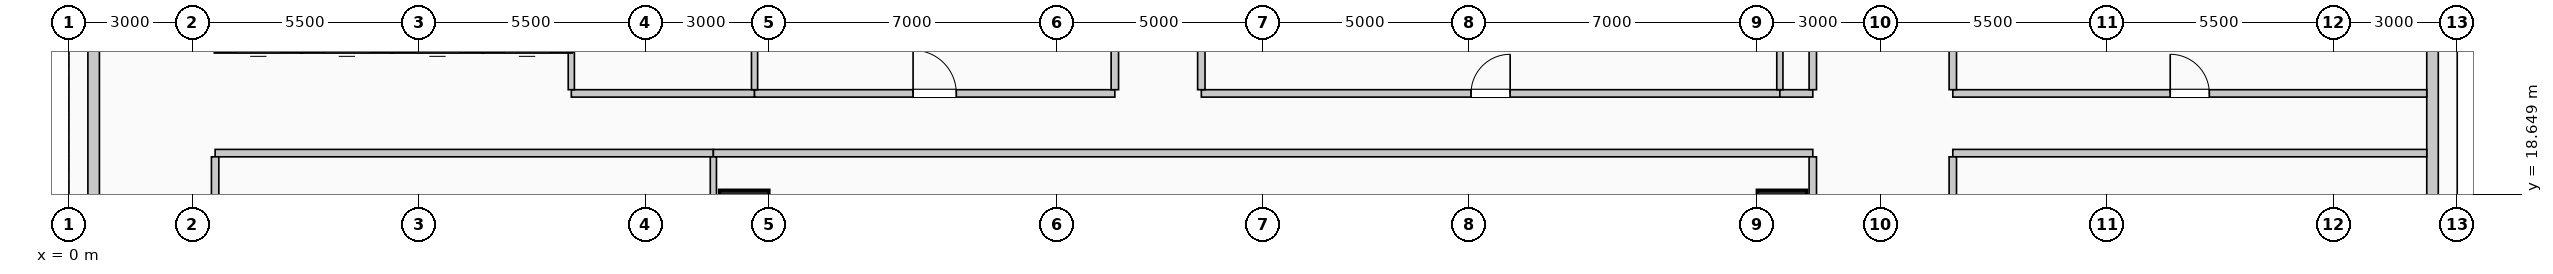
"""IFC4 building model, lengths in metres.
Left out: names, types, materials, properties, quantities, classifications, styles, units other than length and angle.
Written with IfcOpenShell. Run it as: python <this file> out.ifc"""

import sys

from ifc_helpers import new_model, si_unit, direction, frame, frame_2d, origin, origin_2d, place, context, subcontext, project, spatial, rectangle, extrude, element, fill, save


model = new_model("IFC4")
c1 = context("Model", 3, precision=1e-05, world=origin(), true_north=direction((0.0, 1.0)))
c2 = subcontext(c1, "Body", "Model", "MODEL_VIEW")
j1 = project(units=[si_unit("LENGTHUNIT", "METRE"), si_unit("PLANEANGLEUNIT", "RADIAN")], contexts=[c1])
p1 = place(None, origin())
s1 = spatial("IfcSite", under=j1, at=p1, CompositionType="ELEMENT")
p2 = place(p1, origin())
s2 = spatial("IfcBuilding", under=s1, at=p2, CompositionType="ELEMENT")
p3 = place(p2, frame((0.0, 0.0, 62.6)))
s3 = spatial("IfcBuildingStorey", under=s2, at=p3, CompositionType="ELEMENT", Elevation=62.6)
for number, where, z_axis, x_axis in (
    (1, (16.4, 18.0, 0.0), (0.0, 0.0, 1.0), (1.0, 0.0, 0.0)),
    (2, (41.6, 18.0, 0.0), (0.0, 0.0, 1.0), (1.0, 0.0, 0.0)),
):
    element("IfcColumn", number, at=place(p3, frame(where, z_axis=z_axis, x_axis=x_axis)), inside=s3, PredefinedType="COLUMN", context=c2, shape_type="SweptSolid", body=[
        extrude(rectangle(XDim=1.2, YDim=1.5, at=origin_2d()), origin(), (0.0, 0.0, 1.0), 4.0),
    ])
for number, where, z_axis, x_axis in (
    (3, (0.6, 18.47, 0.0), (0.0, 0.0, 1.0), (0.0, 1.0, 0.0)),
    (4, (57.4, 25.53, 0.0), (0.0, 0.0, 1.0), (0.0, -1.0, 0.0)),
):
    element("IfcWall", number, at=place(p3, frame(where, z_axis=z_axis, x_axis=x_axis)), inside=s3, PredefinedType="SOLIDWALL", context=c2, shape_type="SweptSolid", body=[
        extrude(rectangle(XDim=7.06, YDim=0.28, at=frame_2d((3.53, 0.0))), origin(), (0.0, 0.0, 1.0), 2.85),
    ])
p4 = place(p3, frame((5.65, 22.25, 0.0), z_axis=(0.0, 0.0, 1.0), x_axis=(-1.0, 0.0, 0.0)))
e5 = element("IfcWall", 5, at=p4, inside=s3, PredefinedType="SOLIDWALL", context=c2, shape_type="SweptSolid", body=[
    extrude(rectangle(XDim=2.1, YDim=0.3, at=frame_2d((1.05, 0.0))), origin(), (0.0, 0.0, 1.0), 4.0),
])
p5 = place(p4, frame((0.5, 0.0, 0.0)))
e6 = element("IfcOpeningElement", 6, at=p5, cuts=e5, PredefinedType="OPENING", context=c2, shape_type="SweptSolid", body=[
    extrude(rectangle(XDim=1.1, YDim=2.2, at=frame_2d((0.55, 1.1))), frame((0.0, 0.16, 0.0), z_axis=(0.0, -1.0, 0.0), x_axis=(1.0, 0.0, 0.0)), (0.0, 0.0, 1.0), 0.32),
])
p6 = place(p3, frame((7.85, 22.25, 0.0), z_axis=(0.0, 0.0, 1.0), x_axis=(-1.0, 0.0, 0.0)))
e7 = element("IfcWall", 7, at=p6, inside=s3, PredefinedType="SOLIDWALL", context=c2, shape_type="SweptSolid", body=[
    extrude(rectangle(XDim=2.2, YDim=0.3, at=frame_2d((1.1, 0.0))), origin(), (0.0, 0.0, 1.0), 4.0),
])
p7 = place(p6, frame((0.55, 0.0, 0.0)))
e8 = element("IfcOpeningElement", 8, at=p7, cuts=e7, PredefinedType="OPENING", context=c2, shape_type="SweptSolid", body=[
    extrude(rectangle(XDim=1.1, YDim=2.2, at=frame_2d((0.55, 1.1))), frame((0.0, 0.16, 0.0), z_axis=(0.0, -1.0, 0.0), x_axis=(1.0, 0.0, 0.0)), (0.0, 0.0, 1.0), 0.32),
])
p8 = place(p3, frame((10.05, 22.25, 0.0), z_axis=(0.0, 0.0, 1.0), x_axis=(-1.0, 0.0, 0.0)))
e9 = element("IfcWall", 9, at=p8, inside=s3, PredefinedType="SOLIDWALL", context=c2, shape_type="SweptSolid", body=[
    extrude(rectangle(XDim=2.2, YDim=0.3, at=frame_2d((1.1, 0.0))), origin(), (0.0, 0.0, 1.0), 4.0),
])
p9 = place(p8, frame((0.55, 0.0, 0.0)))
e10 = element("IfcOpeningElement", 10, at=p9, cuts=e9, PredefinedType="OPENING", context=c2, shape_type="SweptSolid", body=[
    extrude(rectangle(XDim=1.1, YDim=2.2, at=frame_2d((0.55, 1.1))), frame((0.0, 0.16, 0.0), z_axis=(0.0, -1.0, 0.0), x_axis=(1.0, 0.0, 0.0)), (0.0, 0.0, 1.0), 0.32),
])
p10 = place(p3, frame((12.2, 22.25, 0.0), z_axis=(0.0, 0.0, 1.0), x_axis=(-1.0, 0.0, 0.0)))
e11 = element("IfcWall", 11, at=p10, inside=s3, PredefinedType="SOLIDWALL", context=c2, shape_type="SweptSolid", body=[
    extrude(rectangle(XDim=2.15, YDim=0.3, at=frame_2d((1.075, 0.0))), origin(), (0.0, 0.0, 1.0), 4.0),
])
p11 = place(p10, frame((0.525, 0.0, 0.0)))
e12 = element("IfcOpeningElement", 12, at=p11, cuts=e11, PredefinedType="OPENING", context=c2, shape_type="SweptSolid", body=[
    extrude(rectangle(XDim=1.1, YDim=2.2, at=frame_2d((0.55, 1.1))), frame((0.0, 0.16, 0.0), z_axis=(0.0, -1.0, 0.0), x_axis=(1.0, 0.0, 0.0)), (0.0, 0.0, 1.0), 0.32),
])
p12 = place(p3, frame((3.55, 19.65, 0.0), z_axis=(0.0, 0.0, 1.0), x_axis=(1.0, 0.0, 0.0)))
e13 = element("IfcWall", 13, at=p12, inside=s3, PredefinedType="PARTITIONING", context=c2, shape_type="SweptSolid", body=[
    extrude(rectangle(XDim=12.1, YDim=0.18, at=frame_2d((6.05, 0.0))), origin(), (0.0, 0.0, 1.0), 3.7),
])
p13 = place(p3, frame((15.65, 19.65, 0.0), z_axis=(0.0, 0.0, 1.0), x_axis=(1.0, 0.0, 0.0)))
e14 = element("IfcWall", 14, at=p13, inside=s3, PredefinedType="PARTITIONING", context=c2, shape_type="SweptSolid", body=[
    extrude(rectangle(XDim=26.7, YDim=0.18, at=frame_2d((13.35, 0.0))), origin(), (0.0, 0.0, 1.0), 3.7),
])
p14 = place(p3, frame((45.75, 19.65, 0.0), z_axis=(0.0, 0.0, 1.0), x_axis=(1.0, 0.0, 0.0)))
e15 = element("IfcWall", 15, at=p14, inside=s3, PredefinedType="PARTITIONING", context=c2, shape_type="SweptSolid", body=[
    extrude(rectangle(XDim=11.51, YDim=0.18, at=frame_2d((5.755, 0.0))), origin(), (0.0, 0.0, 1.0), 3.7),
])
p15 = place(p3, frame((12.2, 21.1, 0.0), z_axis=(0.0, 0.0, 1.0), x_axis=(1.0, 0.0, 0.0)))
e16 = element("IfcWall", 16, at=p15, inside=s3, PredefinedType="PARTITIONING", context=c2, shape_type="SweptSolid", body=[
    extrude(rectangle(XDim=4.45, YDim=0.18, at=frame_2d((2.225, 0.0))), origin(), (0.0, 0.0, 1.0), 3.7),
])
p16 = place(p3, frame((16.65, 21.1, 0.0), z_axis=(0.0, 0.0, 1.0), x_axis=(1.0, 0.0, 0.0)))
e17 = element("IfcWall", 17, at=p16, inside=s3, PredefinedType="PARTITIONING", context=c2, shape_type="SweptSolid", body=[
    extrude(rectangle(XDim=8.75, YDim=0.18, at=frame_2d((4.375, 0.0))), origin(), (0.0, 0.0, 1.0), 3.7),
])
p17 = place(p16, frame((3.85, 0.0, 0.0)))
e18 = element("IfcOpeningElement", 18, at=p17, cuts=e17, PredefinedType="OPENING", context=c2, shape_type="SweptSolid", body=[
    extrude(rectangle(XDim=1.05, YDim=2.15, at=frame_2d((0.525, 1.075))), frame((0.0, 0.1, 0.0), z_axis=(0.0, -1.0, 0.0), x_axis=(1.0, 0.0, 0.0)), (0.0, 0.0, 1.0), 0.2),
])
p18 = place(p3, frame((27.5, 21.1, 0.0), z_axis=(0.0, 0.0, 1.0), x_axis=(1.0, 0.0, 0.0)))
e19 = element("IfcWall", 19, at=p18, inside=s3, PredefinedType="PARTITIONING", context=c2, shape_type="SweptSolid", body=[
    extrude(rectangle(XDim=14.05, YDim=0.18, at=frame_2d((7.025, 0.0))), origin(), (0.0, 0.0, 1.0), 3.7),
])
p19 = place(p18, frame((6.55, 0.0, 0.0)))
e20 = element("IfcOpeningElement", 20, at=p19, cuts=e19, PredefinedType="OPENING", context=c2, shape_type="SweptSolid", body=[
    extrude(rectangle(XDim=0.95, YDim=2.15, at=frame_2d((0.475, 1.075))), frame((0.0, 0.1, 0.0), z_axis=(0.0, -1.0, 0.0), x_axis=(1.0, 0.0, 0.0)), (0.0, 0.0, 1.0), 0.2),
])
p20 = place(p3, frame((41.55, 21.1, 0.0), z_axis=(0.0, 0.0, 1.0), x_axis=(1.0, 0.0, 0.0)))
e21 = element("IfcWall", 21, at=p20, inside=s3, PredefinedType="PARTITIONING", context=c2, shape_type="SweptSolid", body=[
    extrude(rectangle(XDim=0.8, YDim=0.18, at=frame_2d((0.4, 0.0))), origin(), (0.0, 0.0, 1.0), 3.7),
])
p21 = place(p3, frame((45.75, 21.1, 0.0), z_axis=(0.0, 0.0, 1.0), x_axis=(1.0, 0.0, 0.0)))
e22 = element("IfcWall", 22, at=p21, inside=s3, PredefinedType="PARTITIONING", context=c2, shape_type="SweptSolid", body=[
    extrude(rectangle(XDim=11.51, YDim=0.18, at=frame_2d((5.755, 0.0))), origin(), (0.0, 0.0, 1.0), 3.7),
])
p22 = place(p21, frame((5.28, 0.0, 0.0)))
e23 = element("IfcOpeningElement", 23, at=p22, cuts=e22, PredefinedType="OPENING", context=c2, shape_type="SweptSolid", body=[
    extrude(rectangle(XDim=0.95, YDim=2.15, at=frame_2d((0.475, 1.075))), frame((0.0, 0.1, 0.0), z_axis=(0.0, -1.0, 0.0), x_axis=(1.0, 0.0, 0.0)), (0.0, 0.0, 1.0), 0.2),
])
p23 = place(p3, frame((3.55, 16.39, 0.0), z_axis=(0.0, 0.0, 1.0), x_axis=(0.0, 1.0, 0.0)))
e24 = element("IfcWall", 24, at=p23, inside=s3, PredefinedType="PARTITIONING", context=c2, shape_type="SweptSolid", body=[
    extrude(rectangle(XDim=3.17, YDim=0.18, at=frame_2d((1.585, 0.0))), origin(), (0.0, 0.0, 1.0), 3.7),
])
p24 = place(p3, frame((12.2, 21.19, 0.0), z_axis=(0.0, 0.0, 1.0), x_axis=(0.0, 1.0, 0.0)))
e25 = element("IfcWall", 25, at=p24, inside=s3, PredefinedType="PARTITIONING", context=c2, shape_type="SweptSolid", body=[
    extrude(rectangle(XDim=0.91, YDim=0.15, at=frame_2d((0.455, 0.0))), origin(), (0.0, 0.0, 1.0), 3.7),
])
p25 = place(p3, frame((15.65, 16.39, 0.0), z_axis=(0.0, 0.0, 1.0), x_axis=(0.0, 1.0, 0.0)))
e26 = element("IfcWall", 26, at=p25, inside=s3, PredefinedType="PARTITIONING", context=c2, shape_type="SweptSolid", body=[
    extrude(rectangle(XDim=3.17, YDim=0.15, at=frame_2d((1.585, 0.0))), origin(), (0.0, 0.0, 1.0), 3.7),
])
p26 = place(p3, frame((16.65, 21.19, 0.0), z_axis=(0.0, 0.0, 1.0), x_axis=(0.0, 1.0, 0.0)))
e27 = element("IfcWall", 27, at=p26, inside=s3, PredefinedType="PARTITIONING", context=c2, shape_type="SweptSolid", body=[
    extrude(rectangle(XDim=3.735, YDim=0.15, at=frame_2d((1.868, 0.0))), origin(), (0.0, 0.0, 1.0), 2.995),
])
p27 = place(p3, frame((25.4, 21.19, 0.0), z_axis=(0.0, 0.0, 1.0), x_axis=(0.0, 1.0, 0.0)))
e28 = element("IfcWall", 28, at=p27, inside=s3, PredefinedType="PARTITIONING", context=c2, shape_type="SweptSolid", body=[
    extrude(rectangle(XDim=3.735, YDim=0.18, at=frame_2d((1.868, 0.0))), origin(), (0.0, 0.0, 1.0), 3.7),
])
p28 = place(p3, frame((27.5, 21.19, 0.0), z_axis=(0.0, 0.0, 1.0), x_axis=(0.0, 1.0, 0.0)))
e29 = element("IfcWall", 29, at=p28, inside=s3, PredefinedType="PARTITIONING", context=c2, shape_type="SweptSolid", body=[
    extrude(rectangle(XDim=5.72, YDim=0.18, at=frame_2d((2.86, 0.0))), origin(), (0.0, 0.0, 1.0), 3.7),
])
p29 = place(p3, frame((41.55, 21.19, 0.0), z_axis=(0.0, 0.0, 1.0), x_axis=(0.0, 1.0, 0.0)))
e30 = element("IfcWall", 30, at=p29, inside=s3, PredefinedType="PARTITIONING", context=c2, shape_type="SweptSolid", body=[
    extrude(rectangle(XDim=4.06, YDim=0.15, at=frame_2d((2.03, 0.0))), origin(), (0.0, 0.0, 1.0), 2.995),
])
p30 = place(p3, frame((42.35, 16.39, 0.0), z_axis=(0.0, 0.0, 1.0), x_axis=(0.0, 1.0, 0.0)))
e31 = element("IfcWall", 31, at=p30, inside=s3, PredefinedType="PARTITIONING", context=c2, shape_type="SweptSolid", body=[
    extrude(rectangle(XDim=3.17, YDim=0.18, at=frame_2d((1.585, 0.0))), origin(), (0.0, 0.0, 1.0), 3.7),
])
p31 = place(p3, frame((42.35, 21.19, 0.0), z_axis=(0.0, 0.0, 1.0), x_axis=(0.0, 1.0, 0.0)))
e32 = element("IfcWall", 32, at=p31, inside=s3, PredefinedType="PARTITIONING", context=c2, shape_type="SweptSolid", body=[
    extrude(rectangle(XDim=11.085, YDim=0.18, at=frame_2d((5.542, 0.0))), origin(), (0.0, 0.0, 1.0), 3.7),
])
p32 = place(p3, frame((45.75, 16.39, 0.0), z_axis=(0.0, 0.0, 1.0), x_axis=(0.0, 1.0, 0.0)))
e33 = element("IfcWall", 33, at=p32, inside=s3, PredefinedType="PARTITIONING", context=c2, shape_type="SweptSolid", body=[
    extrude(rectangle(XDim=3.17, YDim=0.18, at=frame_2d((1.585, 0.0))), origin(), (0.0, 0.0, 1.0), 3.7),
])
p33 = place(p3, frame((45.75, 21.19, 0.0), z_axis=(0.0, 0.0, 1.0), x_axis=(0.0, 1.0, 0.0)))
e34 = element("IfcWall", 34, at=p33, inside=s3, PredefinedType="PARTITIONING", context=c2, shape_type="SweptSolid", body=[
    extrude(rectangle(XDim=6.615, YDim=0.18, at=frame_2d((3.308, 0.0))), origin(), (0.0, 0.0, 1.0), 3.7),
])
p34 = place(p17, origin())
e35 = element("IfcDoor", 35, at=p34, inside=s3, OperationType="SINGLE_SWING_LEFT", PredefinedType="DOOR", context=c2, shape_type="SweptSolid", body=[
    extrude(rectangle(XDim=1.05, YDim=2.15, at=frame_2d((0.525, 1.075))), frame((0.0, 0.025, 0.0), z_axis=(0.0, -1.0, 0.0), x_axis=(1.0, 0.0, 0.0)), (0.0, 0.0, 1.0), 0.05),
])
fill(e18, e35)
p35 = place(p19, origin())
e36 = element("IfcDoor", 36, at=p35, inside=s3, OperationType="SINGLE_SWING_RIGHT", PredefinedType="DOOR", context=c2, shape_type="SweptSolid", body=[
    extrude(rectangle(XDim=0.95, YDim=2.15, at=frame_2d((0.475, 1.075))), frame((0.0, 0.025, 0.0), z_axis=(0.0, -1.0, 0.0), x_axis=(1.0, 0.0, 0.0)), (0.0, 0.0, 1.0), 0.05),
])
fill(e20, e36)
p36 = place(p22, origin())
e37 = element("IfcDoor", 37, at=p36, inside=s3, OperationType="SINGLE_SWING_LEFT", PredefinedType="DOOR", context=c2, shape_type="SweptSolid", body=[
    extrude(rectangle(XDim=0.95, YDim=2.15, at=frame_2d((0.475, 1.075))), frame((0.0, 0.025, 0.0), z_axis=(0.0, -1.0, 0.0), x_axis=(1.0, 0.0, 0.0)), (0.0, 0.0, 1.0), 0.05),
])
fill(e23, e37)
save(model, sys.argv[1])
